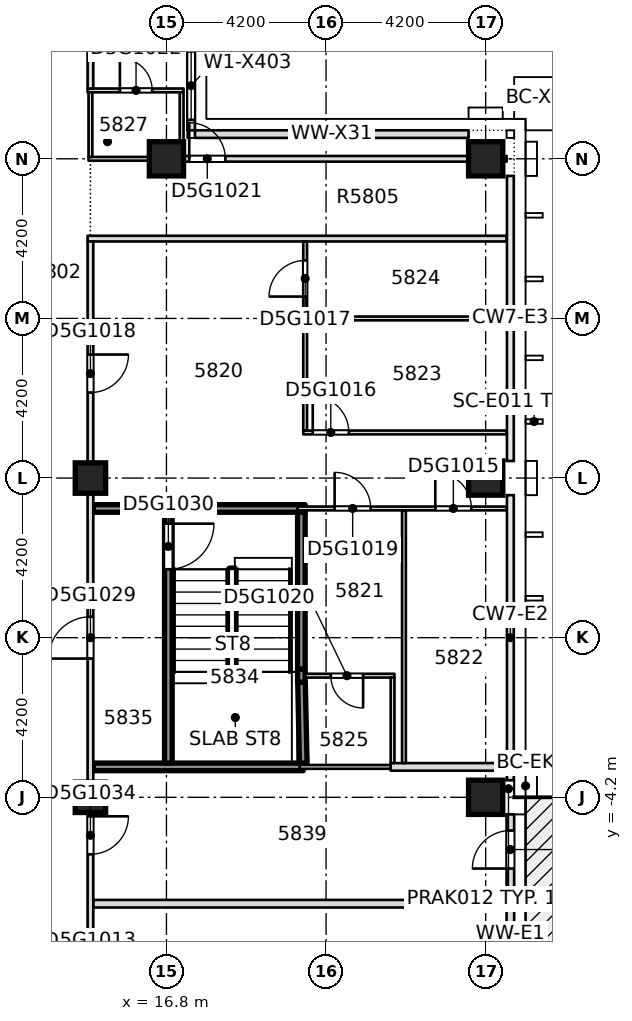
"""IFC4 building model, lengths in metres.
Left out: names, types, materials, properties, quantities, classifications, styles, units other than length and angle.
Written with IfcOpenShell. Run it as: python <this file> out.ifc"""

import sys

from ifc_helpers import new_model, si_unit, direction, frame, frame_2d, origin, origin_2d, place, context, subcontext, project, spatial, rectangle, extrude, element, fill, save


model = new_model("IFC4")
c1 = context("Model", 3, precision=1e-05, world=origin(), true_north=direction((0.0, 1.0)))
c2 = subcontext(c1, "Body", "Model", "MODEL_VIEW")
j1 = project(units=[si_unit("LENGTHUNIT", "METRE"), si_unit("PLANEANGLEUNIT", "RADIAN")], contexts=[c1])
p1 = place(None, origin())
s1 = spatial("IfcSite", under=j1, at=p1, CompositionType="ELEMENT")
p2 = place(p1, origin())
s2 = spatial("IfcBuilding", under=s1, at=p2, CompositionType="ELEMENT")
p3 = place(p2, frame((0.0, 0.0, 223.45)))
s3 = spatial("IfcBuildingStorey", under=s2, at=p3, CompositionType="ELEMENT", Elevation=223.45)
for number, where, z_axis, x_axis in (
    (1, (25.2, -4.2, -0.4), (0.0, 0.0, 1.0), (1.0, 0.0, 0.0)),
    (2, (25.2, 4.2, -0.4), (0.0, 0.0, 1.0), (1.0, 0.0, 0.0)),
    (3, (16.8, 12.6, -0.4), (0.0, 0.0, 1.0), (1.0, 0.0, 0.0)),
    (4, (25.2, 12.6, -0.4), (0.0, 0.0, 1.0), (1.0, 0.0, 0.0)),
):
    element("IfcColumn", number, at=place(p3, frame(where, z_axis=z_axis, x_axis=x_axis)), inside=s3, PredefinedType="COLUMN", context=c2, shape_type="SweptSolid", body=[
        extrude(rectangle(XDim=0.9, YDim=0.9, at=origin_2d()), origin(), (0.0, 0.0, 1.0), 3.45),
    ])
for number, where, z_axis, x_axis in (
    (5, (14.8, -4.2, -0.4), (0.0, 0.0, 1.0), (1.0, 0.0, 0.0)),
    (6, (14.8, 4.2, -0.4), (0.0, 0.0, 1.0), (1.0, 0.0, 0.0)),
):
    element("IfcColumn", number, at=place(p3, frame(where, z_axis=z_axis, x_axis=x_axis)), inside=s3, PredefinedType="COLUMN", context=c2, shape_type="SweptSolid", body=[
        extrude(rectangle(XDim=0.8, YDim=0.8, at=origin_2d()), origin(), (0.0, 0.0, 1.0), 3.45),
    ])
p4 = place(p3, frame((14.875, -7.0, 0.0), z_axis=(0.0, 0.0, 1.0), x_axis=(1.0, 0.0, 0.0)))
e7 = element("IfcWall", 7, at=p4, inside=s3, PredefinedType="PARTITIONING", context=c2, shape_type="SweptSolid", body=[
    extrude(rectangle(XDim=10.875, YDim=0.2, at=frame_2d((5.438, 0.0))), origin(), (0.0, 0.0, 1.0), 3.05),
])
p5 = place(p3, frame((14.875, -3.4, 0.0), z_axis=(0.0, 0.0, 1.0), x_axis=(1.0, 0.0, 0.0)))
e8 = element("IfcWall", 8, at=p5, inside=s3, PredefinedType="SOLIDWALL", context=c2, shape_type="SweptSolid", body=[
    extrude(rectangle(XDim=5.525, YDim=0.2, at=frame_2d((2.762, 0.0))), origin(), (0.0, 0.0, 1.0), 3.05),
])
p6 = place(p3, frame((20.3, -3.4, 0.0), z_axis=(0.0, 0.0, 1.0), x_axis=(1.0, 0.0, 0.0)))
e9 = element("IfcWall", 9, at=p6, inside=s3, PredefinedType="PARTITIONING", context=c2, shape_type="SweptSolid", body=[
    extrude(rectangle(XDim=2.5, YDim=0.1, at=frame_2d((1.25, 0.0))), origin(), (0.0, 0.0, 1.0), 3.05),
])
p7 = place(p3, frame((22.7, -3.4, 0.0), z_axis=(0.0, 0.0, 1.0), x_axis=(1.0, 0.0, 0.0)))
e10 = element("IfcWall", 10, at=p7, inside=s3, PredefinedType="PARTITIONING", context=c2, shape_type="SweptSolid", body=[
    extrude(rectangle(XDim=3.05, YDim=0.2, at=frame_2d((1.525, 0.0))), origin(), (0.0, 0.0, 1.0), 3.05),
])
p8 = place(p3, frame((20.45, -1.0, 0.0), z_axis=(0.0, 0.0, 1.0), x_axis=(1.0, 0.0, 0.0)))
e11 = element("IfcWall", 11, at=p8, inside=s3, PredefinedType="PARTITIONING", context=c2, shape_type="SweptSolid", body=[
    extrude(rectangle(XDim=2.35, YDim=0.1, at=frame_2d((1.175, 0.0))), origin(), (0.0, 0.0, 1.0), 3.05),
])
p9 = place(p8, frame((0.675, 0.0, 0.0)))
e12 = element("IfcOpeningElement", 12, at=p9, cuts=e11, PredefinedType="OPENING", context=c2, shape_type="SweptSolid", body=[
    extrude(rectangle(XDim=0.85, YDim=2.1, at=frame_2d((0.425, 1.05))), frame((0.0, 0.06, 0.0), z_axis=(0.0, -1.0, 0.0), x_axis=(1.0, 0.0, 0.0)), (0.0, 0.0, 1.0), 0.12),
])
p10 = place(p3, frame((14.875, 3.4, 0.0), z_axis=(0.0, 0.0, 1.0), x_axis=(1.0, 0.0, 0.0)))
e13 = element("IfcWall", 13, at=p10, inside=s3, PredefinedType="SOLIDWALL", context=c2, shape_type="SweptSolid", body=[
    extrude(rectangle(XDim=5.575, YDim=0.2, at=frame_2d((2.788, 0.0))), origin(), (0.0, 0.0, 1.0), 3.05),
])
p11 = place(p3, frame((20.25, 3.4, 0.0), z_axis=(0.0, 0.0, 1.0), x_axis=(1.0, 0.0, 0.0)))
e14 = element("IfcWall", 14, at=p11, inside=s3, PredefinedType="PARTITIONING", context=c2, shape_type="SweptSolid", body=[
    extrude(rectangle(XDim=5.5, YDim=0.1, at=frame_2d((2.75, 0.0))), origin(), (0.0, 0.0, 1.0), 3.05),
])
p12 = place(p11, frame((3.625, 0.0, 0.0)))
e15 = element("IfcOpeningElement", 15, at=p12, cuts=e14, PredefinedType="OPENING", context=c2, shape_type="SweptSolid", body=[
    extrude(rectangle(XDim=0.95, YDim=2.1, at=frame_2d((0.475, 1.05))), frame((0.0, 0.06, 0.0), z_axis=(0.0, -1.0, 0.0), x_axis=(1.0, 0.0, 0.0)), (0.0, 0.0, 1.0), 0.12),
])
p13 = place(p11, frame((0.975, 0.0, 0.0)))
e16 = element("IfcOpeningElement", 16, at=p13, cuts=e14, PredefinedType="OPENING", context=c2, shape_type="SweptSolid", body=[
    extrude(rectangle(XDim=0.95, YDim=2.1, at=frame_2d((0.475, 1.05))), frame((0.0, 0.06, 0.0), z_axis=(0.0, -1.0, 0.0), x_axis=(1.0, 0.0, 0.0)), (0.0, 0.0, 1.0), 0.12),
])
p14 = place(p3, frame((20.4, 5.4, 0.0), z_axis=(0.0, 0.0, 1.0), x_axis=(1.0, 0.0, 0.0)))
e17 = element("IfcWall", 17, at=p14, inside=s3, PredefinedType="PARTITIONING", context=c2, shape_type="SweptSolid", body=[
    extrude(rectangle(XDim=5.35, YDim=0.1, at=frame_2d((2.675, 0.0))), origin(), (0.0, 0.0, 1.0), 3.05),
])
p15 = place(p14, frame((0.25, 0.0, 0.0)))
e18 = element("IfcOpeningElement", 18, at=p15, cuts=e17, PredefinedType="OPENING", context=c2, shape_type="SweptSolid", body=[
    extrude(rectangle(XDim=0.95, YDim=2.1, at=frame_2d((0.475, 1.05))), frame((0.0, 0.06, 0.0), z_axis=(0.0, -1.0, 0.0), x_axis=(1.0, 0.0, 0.0)), (0.0, 0.0, 1.0), 0.12),
])
p16 = place(p3, frame((20.5, 8.4, 0.0), z_axis=(0.0, 0.0, 1.0), x_axis=(1.0, 0.0, 0.0)))
e19 = element("IfcWall", 19, at=p16, inside=s3, PredefinedType="PARTITIONING", context=c2, shape_type="SweptSolid", body=[
    extrude(rectangle(XDim=5.25, YDim=0.1, at=frame_2d((2.625, 0.0))), origin(), (0.0, 0.0, 1.0), 3.05),
])
p17 = place(p3, frame((14.725, 10.5, 0.0), z_axis=(0.0, 0.0, 1.0), x_axis=(1.0, 0.0, 0.0)))
e20 = element("IfcWall", 20, at=p17, inside=s3, PredefinedType="PARTITIONING", context=c2, shape_type="SweptSolid", body=[
    extrude(rectangle(XDim=11.025, YDim=0.15, at=frame_2d((5.512, 0.0))), origin(), (0.0, 0.0, 1.0), 3.05),
])
p18 = place(p3, frame((14.75, 12.6, 0.0), z_axis=(0.0, 0.0, 1.0), x_axis=(1.0, 0.0, 0.0)))
e21 = element("IfcWall", 21, at=p18, inside=s3, PredefinedType="PARTITIONING", context=c2, shape_type="SweptSolid", body=[
    extrude(rectangle(XDim=2.5, YDim=0.1, at=frame_2d((1.25, 0.0))), origin(), (0.0, 0.0, 1.0), 3.05),
])
p19 = place(p3, frame((17.15, 12.6, 0.0), z_axis=(0.0, 0.0, 1.0), x_axis=(1.0, 0.0, 0.0)))
e22 = element("IfcWall", 22, at=p19, inside=s3, PredefinedType="PARTITIONING", context=c2, shape_type="SweptSolid", body=[
    extrude(rectangle(XDim=0.1, YDim=0.15, at=frame_2d((0.05, 0.0))), origin(), (0.0, 0.0, 1.0), 3.05),
])
p20 = place(p3, frame((14.725, 14.4, 0.0), z_axis=(0.0, 0.0, 1.0), x_axis=(1.0, 0.0, 0.0)))
e23 = element("IfcWall", 23, at=p20, inside=s3, PredefinedType="PARTITIONING", context=c2, shape_type="SweptSolid", body=[
    extrude(rectangle(XDim=2.525, YDim=0.1, at=frame_2d((1.262, 0.0))), origin(), (0.0, 0.0, 1.0), 3.05),
])
p21 = place(p20, frame((0.85, 0.0, 0.0)))
e24 = element("IfcOpeningElement", 24, at=p21, cuts=e23, PredefinedType="OPENING", context=c2, shape_type="SweptSolid", body=[
    extrude(rectangle(XDim=0.85, YDim=2.1, at=frame_2d((0.425, 1.05))), frame((0.0, 0.06, 0.0), z_axis=(0.0, -1.0, 0.0), x_axis=(1.0, 0.0, 0.0)), (0.0, 0.0, 1.0), 0.12),
])
p22 = place(p3, frame((14.8, -10.55, 0.0), z_axis=(0.0, 0.0, 1.0), x_axis=(0.0, 1.0, 0.0)))
e25 = element("IfcWall", 25, at=p22, inside=s3, PredefinedType="PARTITIONING", context=c2, shape_type="SweptSolid", body=[
    extrude(rectangle(XDim=20.975, YDim=0.15, at=frame_2d((10.488, 0.0))), origin(), (0.0, 0.0, 1.0), 3.05),
])
p23 = place(p22, frame((1.0, 0.0, 0.0)))
e26 = element("IfcOpeningElement", 26, at=p23, cuts=e25, PredefinedType="OPENING", context=c2, shape_type="SweptSolid", body=[
    extrude(rectangle(XDim=0.95, YDim=2.1, at=frame_2d((0.475, 1.05))), frame((0.0, 0.085, 0.0), z_axis=(0.0, -1.0, 0.0), x_axis=(1.0, 0.0, 0.0)), (0.0, 0.0, 1.0), 0.17),
])
p24 = place(p22, frame((17.0, 0.0, 0.0)))
e27 = element("IfcOpeningElement", 27, at=p24, cuts=e25, PredefinedType="OPENING", context=c2, shape_type="SweptSolid", body=[
    extrude(rectangle(XDim=1.0, YDim=2.1, at=frame_2d((0.5, 1.05))), frame((0.0, 0.085, 0.0), z_axis=(0.0, -1.0, 0.0), x_axis=(1.0, 0.0, 0.0)), (0.0, 0.0, 1.0), 0.17),
])
p25 = place(p22, frame((10.0, 0.0, 0.0)))
e28 = element("IfcOpeningElement", 28, at=p25, cuts=e25, PredefinedType="OPENING", context=c2, shape_type="SweptSolid", body=[
    extrude(rectangle(XDim=1.1, YDim=2.1, at=frame_2d((0.55, 1.05))), frame((0.0, 0.085, 0.0), z_axis=(0.0, -1.0, 0.0), x_axis=(1.0, 0.0, 0.0)), (0.0, 0.0, 1.0), 0.17),
])
p26 = place(p22, frame((4.85, 0.0, 0.0)))
e29 = element("IfcOpeningElement", 29, at=p26, cuts=e25, PredefinedType="OPENING", context=c2, shape_type="SweptSolid", body=[
    extrude(rectangle(XDim=1.0, YDim=2.1, at=frame_2d((0.5, 1.05))), frame((0.0, 0.085, 0.0), z_axis=(0.0, -1.0, 0.0), x_axis=(1.0, 0.0, 0.0)), (0.0, 0.0, 1.0), 0.17),
])
p27 = place(p3, frame((14.8, 12.65, 0.0), z_axis=(0.0, 0.0, 1.0), x_axis=(0.0, 1.0, 0.0)))
e30 = element("IfcWall", 30, at=p27, inside=s3, PredefinedType="PARTITIONING", context=c2, shape_type="SweptSolid", body=[
    extrude(rectangle(XDim=1.7, YDim=0.1, at=frame_2d((0.85, 0.0))), origin(), (0.0, 0.0, 1.0), 3.05),
])
p28 = place(p3, frame((14.8, 14.45, 0.0), z_axis=(0.0, 0.0, 1.0), x_axis=(0.0, 1.0, 0.0)))
e31 = element("IfcWall", 31, at=p28, inside=s3, PredefinedType="PARTITIONING", context=c2, shape_type="SweptSolid", body=[
    extrude(rectangle(XDim=7.1, YDim=0.15, at=frame_2d((3.55, 0.0))), origin(), (0.0, 0.0, 1.0), 3.05),
])
p29 = place(p3, frame((16.85, -3.3, 0.0), z_axis=(0.0, 0.0, 1.0), x_axis=(0.0, 1.0, 0.0)))
e32 = element("IfcWall", 32, at=p29, inside=s3, PredefinedType="SOLIDWALL", context=c2, shape_type="SweptSolid", body=[
    extrude(rectangle(XDim=6.6, YDim=0.2, at=frame_2d((3.3, 0.0))), origin(), (0.0, 0.0, 1.0), 3.05),
])
p30 = place(p29, frame((5.1, 0.0, 0.0)))
e33 = element("IfcOpeningElement", 33, at=p30, cuts=e32, PredefinedType="OPENING", context=c2, shape_type="SweptSolid", body=[
    extrude(rectangle(XDim=1.2, YDim=2.1, at=frame_2d((0.6, 1.05))), frame((0.0, 0.11, 0.0), z_axis=(0.0, -1.0, 0.0), x_axis=(1.0, 0.0, 0.0)), (0.0, 0.0, 1.0), 0.22),
])
p31 = place(p3, frame((17.2, 12.675, 0.0), z_axis=(0.0, 0.0, 1.0), x_axis=(0.0, 1.0, 0.0)))
e34 = element("IfcWall", 34, at=p31, inside=s3, PredefinedType="PARTITIONING", context=c2, shape_type="SweptSolid", body=[
    extrude(rectangle(XDim=1.675, YDim=0.1, at=frame_2d((0.837, 0.0))), origin(), (0.0, 0.0, 1.0), 3.05),
])
p32 = place(p3, frame((20.4, -3.3, 0.0), z_axis=(0.0, 0.0, 1.0), x_axis=(-0.021771342749, 0.999762976227, 0.0)))
e35 = element("IfcWall", 35, at=p32, inside=s3, PredefinedType="SOLIDWALL", context=c2, shape_type="SweptSolid", body=[
    extrude(rectangle(XDim=2.131, YDim=0.2, at=frame_2d((1.065, 0.0))), origin(), (0.0, 0.0, 1.0), 3.05),
])
p33 = place(p3, frame((20.35, -0.83, 0.0), z_axis=(0.0, 0.0, 1.0), x_axis=(0.0, 1.0, 0.0)))
e36 = element("IfcWall", 36, at=p33, inside=s3, PredefinedType="SOLIDWALL", context=c2, shape_type="SweptSolid", body=[
    extrude(rectangle(XDim=4.13, YDim=0.2, at=frame_2d((2.065, 0.0))), origin(), (0.0, 0.0, 1.0), 3.05),
])
p34 = place(p3, frame((20.45, 5.45, 0.0), z_axis=(0.0, 0.0, 1.0), x_axis=(0.0, 1.0, 0.0)))
e37 = element("IfcWall", 37, at=p34, inside=s3, PredefinedType="PARTITIONING", context=c2, shape_type="SweptSolid", body=[
    extrude(rectangle(XDim=4.975, YDim=0.1, at=frame_2d((2.488, 0.0))), origin(), (0.0, 0.0, 1.0), 3.05),
])
p35 = place(p34, frame((3.525, 0.0, 0.0)))
e38 = element("IfcOpeningElement", 38, at=p35, cuts=e37, PredefinedType="OPENING", context=c2, shape_type="SweptSolid", body=[
    extrude(rectangle(XDim=0.95, YDim=2.1, at=frame_2d((0.475, 1.05))), frame((0.0, 0.06, 0.0), z_axis=(0.0, -1.0, 0.0), x_axis=(1.0, 0.0, 0.0)), (0.0, 0.0, 1.0), 0.12),
])
p36 = place(p3, frame((22.75, -3.3, 0.0), z_axis=(0.0, 0.0, 1.0), x_axis=(0.0, 1.0, 0.0)))
e39 = element("IfcWall", 39, at=p36, inside=s3, PredefinedType="PARTITIONING", context=c2, shape_type="SweptSolid", body=[
    extrude(rectangle(XDim=2.25, YDim=0.1, at=frame_2d((1.125, 0.0))), origin(), (0.0, 0.0, 1.0), 3.05),
])
p37 = place(p3, frame((23.05, -3.3, 0.0), z_axis=(0.0, 0.0, 1.0), x_axis=(0.0, 1.0, 0.0)))
e40 = element("IfcWall", 40, at=p37, inside=s3, PredefinedType="PARTITIONING", context=c2, shape_type="SweptSolid", body=[
    extrude(rectangle(XDim=6.65, YDim=0.1, at=frame_2d((3.325, 0.0))), origin(), (0.0, 0.0, 1.0), 3.05),
])
p38 = place(p3, frame((25.85, -12.15, 0.0), z_axis=(0.0, 0.0, 1.0), x_axis=(0.0, 1.0, 0.0)))
e41 = element("IfcWall", 41, at=p38, inside=s3, PredefinedType="STANDARD", context=c2, shape_type="SweptSolid", body=[
    extrude(rectangle(XDim=7.5, YDim=0.2, at=frame_2d((3.75, 0.0))), origin(), (0.0, 0.0, 1.0), 3.05),
])
p39 = place(p38, frame((0.425, 0.0, 0.2)))
e42 = element("IfcOpeningElement", 42, at=p39, cuts=e41, PredefinedType="OPENING", context=c2, shape_type="SweptSolid", body=[
    extrude(rectangle(XDim=1.8, YDim=2.65, at=frame_2d((0.9, 1.325))), frame((0.0, 0.11, 0.0), z_axis=(0.0, -1.0, 0.0), x_axis=(1.0, 0.0, 0.0)), (0.0, 0.0, 1.0), 0.22),
])
p40 = place(p38, frame((2.325, 0.0, 0.0)))
e43 = element("IfcOpeningElement", 43, at=p40, cuts=e41, PredefinedType="OPENING", context=c2, shape_type="SweptSolid", body=[
    extrude(rectangle(XDim=1.0, YDim=2.4, at=frame_2d((0.5, 1.2))), frame((0.0, 0.11, 0.0), z_axis=(0.0, -1.0, 0.0), x_axis=(1.0, 0.0, 0.0)), (0.0, 0.0, 1.0), 0.22),
])
p41 = place(p38, frame((6.075, 0.0, 0.0)))
e44 = element("IfcOpeningElement", 44, at=p41, cuts=e41, PredefinedType="OPENING", context=c2, shape_type="SweptSolid", body=[
    extrude(rectangle(XDim=1.0, YDim=2.4, at=frame_2d((0.5, 1.2))), frame((0.0, 0.11, 0.0), z_axis=(0.0, -1.0, 0.0), x_axis=(1.0, 0.0, 0.0)), (0.0, 0.0, 1.0), 0.22),
])
p42 = place(p3, frame((24.75, 13.25, 0.0), z_axis=(0.0, 0.0, 1.0), x_axis=(-1.0, 0.0, 0.0)))
e45 = element("IfcWall", 45, at=p42, inside=s3, PredefinedType="STANDARD", context=c2, shape_type="SweptSolid", body=[
    extrude(rectangle(XDim=7.2, YDim=0.2, at=frame_2d((3.6, 0.0))), origin(), (0.0, 0.0, 1.0), 3.05),
])
p43 = place(p3, frame((17.45, 13.35, 0.0), z_axis=(0.0, 0.0, 1.0), x_axis=(0.0, 1.0, 0.0)))
e46 = element("IfcWall", 46, at=p43, inside=s3, PredefinedType="STANDARD", context=c2, shape_type="SweptSolid", body=[
    extrude(rectangle(XDim=7.2, YDim=0.2, at=frame_2d((3.6, 0.0))), origin(), (0.0, 0.0, 1.0), 3.05),
])
p44 = place(p43, frame((0.275, 0.0, 0.2)))
e47 = element("IfcOpeningElement", 47, at=p44, cuts=e46, PredefinedType="OPENING", context=c2, shape_type="SweptSolid", body=[
    extrude(rectangle(XDim=1.8, YDim=2.65, at=frame_2d((0.9, 1.325))), frame((0.0, 0.11, 0.0), z_axis=(0.0, -1.0, 0.0), x_axis=(1.0, 0.0, 0.0)), (0.0, 0.0, 1.0), 0.22),
])
p45 = place(p43, frame((3.875, 0.0, 0.2)))
e48 = element("IfcOpeningElement", 48, at=p45, cuts=e46, PredefinedType="OPENING", context=c2, shape_type="SweptSolid", body=[
    extrude(rectangle(XDim=1.8, YDim=2.65, at=frame_2d((0.9, 1.325))), frame((0.0, 0.11, 0.0), z_axis=(0.0, -1.0, 0.0), x_axis=(1.0, 0.0, 0.0)), (0.0, 0.0, 1.0), 0.22),
])
p46 = place(p3, frame((20.35, -1.17, 0.0), z_axis=(0.0, 0.0, 1.0), x_axis=(0.0, 1.0, 0.0)))
e49 = element("IfcWall", 49, at=p46, inside=s3, PredefinedType="SOLIDWALL", context=c2, shape_type="SweptSolid", body=[
    extrude(rectangle(XDim=0.34, YDim=0.2, at=frame_2d((0.17, 0.0))), origin(), (0.0, 0.0, 1.0), 3.05),
])
p47 = place(p3, frame((17.25, 12.6, 0.0), z_axis=(0.0, 0.0, 1.0), x_axis=(1.0, 0.0, 0.0)))
e50 = element("IfcWall", 50, at=p47, inside=s3, PredefinedType="PARTITIONING", context=c2, shape_type="SweptSolid", body=[
    extrude(rectangle(XDim=7.5, YDim=0.15, at=frame_2d((3.75, 0.0))), origin(), (0.0, 0.0, 1.0), 2.5),
])
p48 = place(p47, frame((0.15, 0.0, 0.0)))
e51 = element("IfcOpeningElement", 51, at=p48, cuts=e50, PredefinedType="OPENING", context=c2, shape_type="SweptSolid", body=[
    extrude(rectangle(XDim=0.95, YDim=2.1, at=frame_2d((0.475, 1.05))), frame((0.0, 0.085, 0.0), z_axis=(0.0, -1.0, 0.0), x_axis=(1.0, 0.0, 0.0)), (0.0, 0.0, 1.0), 0.17),
])
p49 = place(p3, frame((24.75, 12.6, 0.0), z_axis=(0.0, 0.0, 1.0), x_axis=(1.0, 0.0, 0.0)))
e52 = element("IfcWall", 52, at=p49, inside=s3, PredefinedType="PARTITIONING", context=c2, shape_type="SweptSolid", body=[
    extrude(rectangle(XDim=1.0, YDim=0.15, at=frame_2d((0.5, 0.0))), origin(), (0.0, 0.0, 1.0), 3.05),
])
p50 = place(p12, origin())
e53 = element("IfcDoor", 53, at=p50, inside=s3, OperationType="SINGLE_SWING_LEFT", PredefinedType="DOOR", context=c2, shape_type="SweptSolid", body=[
    extrude(rectangle(XDim=0.95, YDim=2.1, at=frame_2d((0.475, 1.05))), frame((0.0, 0.025, 0.0), z_axis=(0.0, -1.0, 0.0), x_axis=(1.0, 0.0, 0.0)), (0.0, 0.0, 1.0), 0.05),
])
fill(e15, e53)
p51 = place(p15, origin())
e54 = element("IfcDoor", 54, at=p51, inside=s3, OperationType="SINGLE_SWING_LEFT", PredefinedType="DOOR", context=c2, shape_type="SweptSolid", body=[
    extrude(rectangle(XDim=0.95, YDim=2.1, at=frame_2d((0.475, 1.05))), frame((0.0, 0.025, 0.0), z_axis=(0.0, -1.0, 0.0), x_axis=(1.0, 0.0, 0.0)), (0.0, 0.0, 1.0), 0.05),
])
fill(e18, e54)
p52 = place(p35, origin())
e55 = element("IfcDoor", 55, at=p52, inside=s3, OperationType="SINGLE_SWING_RIGHT", PredefinedType="DOOR", context=c2, shape_type="SweptSolid", body=[
    extrude(rectangle(XDim=0.95, YDim=2.1, at=frame_2d((0.475, 1.05))), frame((0.0, 0.025, 0.0), z_axis=(0.0, -1.0, 0.0), x_axis=(1.0, 0.0, 0.0)), (0.0, 0.0, 1.0), 0.05),
])
fill(e38, e55)
p53 = place(p24, origin())
e56 = element("IfcDoor", 56, at=p53, inside=s3, OperationType="SINGLE_SWING_RIGHT", PredefinedType="DOOR", context=c2, shape_type="SweptSolid", body=[
    extrude(rectangle(XDim=1.0, YDim=2.1, at=frame_2d((0.5, 1.05))), frame((0.0, 0.025, 0.0), z_axis=(0.0, -1.0, 0.0), x_axis=(1.0, 0.0, 0.0)), (0.0, 0.0, 1.0), 0.05),
])
fill(e27, e56)
p54 = place(p13, origin())
e57 = element("IfcDoor", 57, at=p54, inside=s3, OperationType="SINGLE_SWING_RIGHT", PredefinedType="DOOR", context=c2, shape_type="SweptSolid", body=[
    extrude(rectangle(XDim=0.95, YDim=2.1, at=frame_2d((0.475, 1.05))), frame((0.0, 0.025, 0.0), z_axis=(0.0, -1.0, 0.0), x_axis=(1.0, 0.0, 0.0)), (0.0, 0.0, 1.0), 0.05),
])
fill(e16, e57)
p55 = place(p9, origin())
e58 = element("IfcDoor", 58, at=p55, inside=s3, OperationType="SINGLE_SWING_RIGHT", PredefinedType="DOOR", context=c2, shape_type="SweptSolid", body=[
    extrude(rectangle(XDim=0.85, YDim=2.1, at=frame_2d((0.425, 1.05))), frame((0.0, 0.025, 0.0), z_axis=(0.0, -1.0, 0.0), x_axis=(1.0, 0.0, 0.0)), (0.0, 0.0, 1.0), 0.05),
])
fill(e12, e58)
p56 = place(p48, origin())
e59 = element("IfcDoor", 59, at=p56, inside=s3, OperationType="SINGLE_SWING_LEFT", PredefinedType="DOOR", context=c2, shape_type="SweptSolid", body=[
    extrude(rectangle(XDim=0.95, YDim=2.1, at=frame_2d((0.475, 1.05))), frame((0.0, 0.025, 0.0), z_axis=(0.0, -1.0, 0.0), x_axis=(1.0, 0.0, 0.0)), (0.0, 0.0, 1.0), 0.05),
])
fill(e51, e59)
p57 = place(p21, origin())
e60 = element("IfcDoor", 60, at=p57, inside=s3, OperationType="SINGLE_SWING_RIGHT", PredefinedType="DOOR", context=c2, shape_type="SweptSolid", body=[
    extrude(rectangle(XDim=0.85, YDim=2.1, at=frame_2d((0.425, 1.05))), frame((0.0, 0.025, 0.0), z_axis=(0.0, -1.0, 0.0), x_axis=(1.0, 0.0, 0.0)), (0.0, 0.0, 1.0), 0.05),
])
fill(e24, e60)
p58 = place(p25, origin())
e61 = element("IfcDoor", 61, at=p58, inside=s3, OperationType="SINGLE_SWING_LEFT", PredefinedType="DOOR", context=c2, shape_type="SweptSolid", body=[
    extrude(rectangle(XDim=1.1, YDim=2.1, at=frame_2d((0.55, 1.05))), frame((0.0, 0.025, 0.0), z_axis=(0.0, -1.0, 0.0), x_axis=(1.0, 0.0, 0.0)), (0.0, 0.0, 1.0), 0.05),
])
fill(e28, e61)
p59 = place(p30, origin())
e62 = element("IfcDoor", 62, at=p59, inside=s3, OperationType="SINGLE_SWING_LEFT", PredefinedType="DOOR", context=c2, shape_type="SweptSolid", body=[
    extrude(rectangle(XDim=1.2, YDim=2.1, at=frame_2d((0.6, 1.05))), frame((0.0, 0.025, 0.0), z_axis=(0.0, -1.0, 0.0), x_axis=(1.0, 0.0, 0.0)), (0.0, 0.0, 1.0), 0.05),
])
fill(e33, e62)
p60 = place(p26, origin())
e63 = element("IfcDoor", 63, at=p60, inside=s3, OperationType="SINGLE_SWING_LEFT", PredefinedType="DOOR", context=c2, shape_type="SweptSolid", body=[
    extrude(rectangle(XDim=1.0, YDim=2.1, at=frame_2d((0.5, 1.05))), frame((0.0, 0.025, 0.0), z_axis=(0.0, -1.0, 0.0), x_axis=(1.0, 0.0, 0.0)), (0.0, 0.0, 1.0), 0.05),
])
fill(e29, e63)
p61 = place(p41, origin())
e64 = element("IfcDoor", 64, at=p61, inside=s3, OperationType="SINGLE_SWING_LEFT", PredefinedType="DOOR", context=c2, shape_type="SweptSolid", body=[
    extrude(rectangle(XDim=1.0, YDim=2.4, at=frame_2d((0.5, 1.2))), frame((0.0, 0.025, 0.0), z_axis=(0.0, -1.0, 0.0), x_axis=(1.0, 0.0, 0.0)), (0.0, 0.0, 1.0), 0.05),
])
fill(e44, e64)
p62 = place(p44, origin())
e65 = element("IfcWindow", 65, at=p62, inside=s3, PartitioningType="SINGLE_PANEL", PredefinedType="WINDOW", context=c2, shape_type="SweptSolid", body=[
    extrude(rectangle(XDim=1.8, YDim=2.65, at=frame_2d((0.9, 1.325))), frame((0.0, 0.03, 0.0), z_axis=(0.0, -1.0, 0.0), x_axis=(1.0, 0.0, 0.0)), (0.0, 0.0, 1.0), 0.06),
])
fill(e47, e65)
save(model, sys.argv[1])
